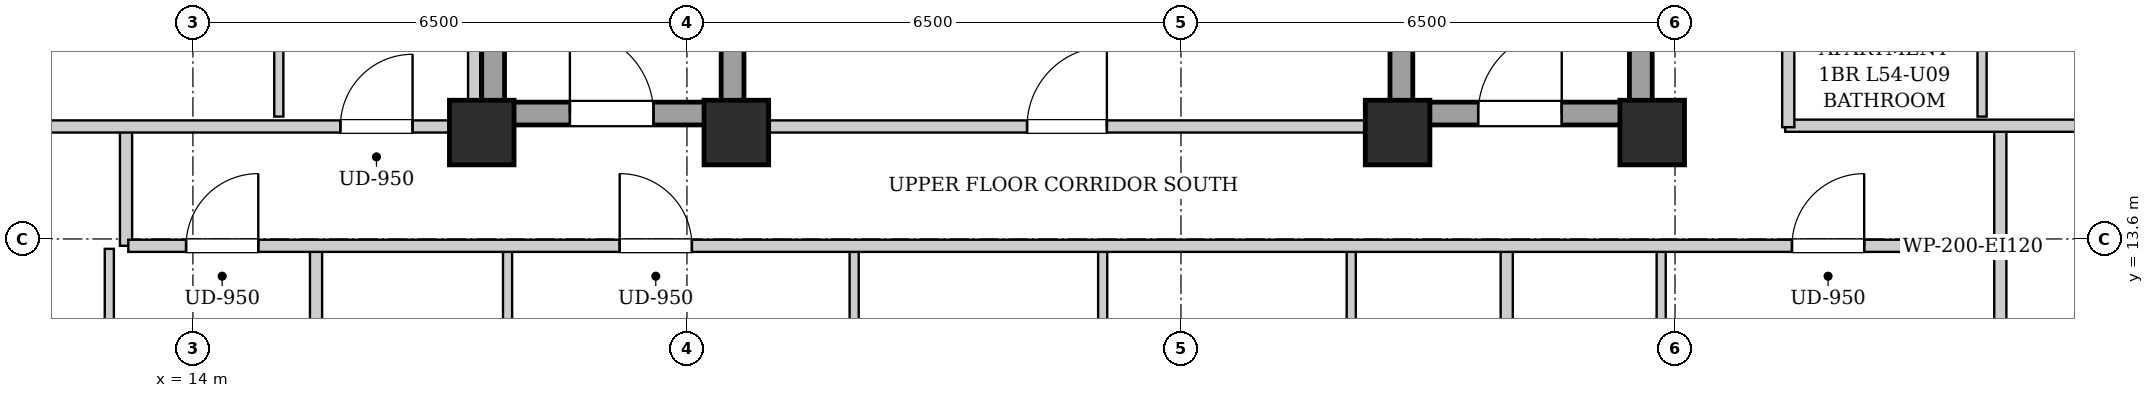
"""IFC4 building model, lengths in metres.
Left out: names, types, materials, properties, quantities, classifications, styles, units other than length and angle.
Written with IfcOpenShell. Run it as: python <this file> out.ifc"""

import sys

from ifc_helpers import new_model, si_unit, direction, frame, frame_2d, origin, origin_2d, place, context, subcontext, project, spatial, rectangle, extrude, element, fill, save


model = new_model("IFC4")
c1 = context("Model", 3, precision=1e-05, world=origin(), true_north=direction((0.0, 1.0)))
c2 = subcontext(c1, "Body", "Model", "MODEL_VIEW")
j1 = project(units=[si_unit("LENGTHUNIT", "METRE"), si_unit("PLANEANGLEUNIT", "RADIAN")], contexts=[c1])
p1 = place(None, origin())
s1 = spatial("IfcSite", under=j1, at=p1, CompositionType="ELEMENT")
p2 = place(p1, origin())
s2 = spatial("IfcBuilding", under=s1, at=p2, CompositionType="ELEMENT")
p3 = place(p2, frame((0.0, 0.0, 187.6)))
s3 = spatial("IfcBuildingStorey", under=s2, at=p3, CompositionType="ELEMENT", Elevation=187.6)
for number, where, z_axis, x_axis in (
    (1, (17.8, 15.0, 0.0), (0.0, 0.0, 1.0), (1.0, 0.0, 0.0)),
    (2, (21.15, 15.0, 0.0), (0.0, 0.0, 1.0), (1.0, 0.0, 0.0)),
    (3, (29.85, 15.0, 0.0), (0.0, 0.0, 1.0), (1.0, 0.0, 0.0)),
    (4, (33.2, 15.0, 0.0), (0.0, 0.0, 1.0), (1.0, 0.0, 0.0)),
):
    element("IfcColumn", number, at=place(p3, frame(where, z_axis=z_axis, x_axis=x_axis)), inside=s3, PredefinedType="COLUMN", context=c2, shape_type="SweptSolid", body=[
        extrude(rectangle(XDim=0.85, YDim=0.85, at=origin_2d()), origin(), (0.0, 0.0, 1.0), 3.3),
    ])
for number, where, z_axis, x_axis in (
    (5, (17.95, 15.1, 0.0), (0.0, 0.0, 1.0), (0.0, 1.0, 0.0)),
    (6, (21.1, 15.1, 0.0), (0.0, 0.0, 1.0), (0.0, 1.0, 0.0)),
):
    element("IfcWall", number, at=place(p3, frame(where, z_axis=z_axis, x_axis=x_axis)), inside=s3, PredefinedType="SHEAR", context=c2, shape_type="SweptSolid", body=[
        extrude(rectangle(XDim=9.0, YDim=0.3, at=frame_2d((4.5, 0.0))), origin(), (0.0, 0.0, 1.0), 3.04),
    ])
p4 = place(p3, frame((18.1, 15.25, 0.0), z_axis=(0.0, 0.0, 1.0), x_axis=(1.0, 0.0, 0.0)))
e7 = element("IfcWall", 7, at=p4, inside=s3, PredefinedType="SHEAR", context=c2, shape_type="SweptSolid", body=[
    extrude(rectangle(XDim=2.85, YDim=0.3, at=frame_2d((1.425, 0.0))), origin(), (0.0, 0.0, 1.0), 3.04),
])
p5 = place(p4, frame((0.86, 0.0, 0.0)))
e8 = element("IfcOpeningElement", 8, at=p5, cuts=e7, PredefinedType="OPENING", context=c2, shape_type="SweptSolid", body=[
    extrude(rectangle(XDim=1.1, YDim=2.05, at=frame_2d((0.55, 1.025))), frame((0.0, 0.16, 0.0), z_axis=(0.0, -1.0, 0.0), x_axis=(1.0, 0.0, 0.0)), (0.0, 0.0, 1.0), 0.32),
])
for number, where, z_axis, x_axis in (
    (9, (29.9, 15.1, 0.0), (0.0, 0.0, 1.0), (0.0, 1.0, 0.0)),
    (10, (33.05, 15.1, 0.0), (0.0, 0.0, 1.0), (0.0, 1.0, 0.0)),
):
    element("IfcWall", number, at=place(p3, frame(where, z_axis=z_axis, x_axis=x_axis)), inside=s3, PredefinedType="SHEAR", context=c2, shape_type="SweptSolid", body=[
        extrude(rectangle(XDim=9.0, YDim=0.3, at=frame_2d((4.5, 0.0))), origin(), (0.0, 0.0, 1.0), 3.04),
    ])
p6 = place(p3, frame((30.05, 15.25, 0.0), z_axis=(0.0, 0.0, 1.0), x_axis=(1.0, 0.0, 0.0)))
e11 = element("IfcWall", 11, at=p6, inside=s3, PredefinedType="SHEAR", context=c2, shape_type="SweptSolid", body=[
    extrude(rectangle(XDim=2.85, YDim=0.3, at=frame_2d((1.425, 0.0))), origin(), (0.0, 0.0, 1.0), 3.04),
])
p7 = place(p6, frame((0.86, 0.0, 0.0)))
e12 = element("IfcOpeningElement", 12, at=p7, cuts=e11, PredefinedType="OPENING", context=c2, shape_type="SweptSolid", body=[
    extrude(rectangle(XDim=1.1, YDim=2.05, at=frame_2d((0.55, 1.025))), frame((0.0, 0.16, 0.0), z_axis=(0.0, -1.0, 0.0), x_axis=(1.0, 0.0, 0.0)), (0.0, 0.0, 1.0), 0.32),
])
p8 = place(p3, frame((21.25, 15.08, 0.0), z_axis=(0.0, 0.0, 1.0), x_axis=(1.0, 0.0, 0.0)))
e13 = element("IfcWall", 13, at=p8, inside=s3, PredefinedType="PARTITIONING", context=c2, shape_type="SweptSolid", body=[
    extrude(rectangle(XDim=8.5, YDim=0.16, at=frame_2d((4.25, 0.0))), origin(), (0.0, 0.0, 1.0), 2.556),
])
p9 = place(p8, frame((3.725, 0.0, 0.0)))
e14 = element("IfcOpeningElement", 14, at=p9, cuts=e13, PredefinedType="OPENING", context=c2, shape_type="SweptSolid", body=[
    extrude(rectangle(XDim=1.05, YDim=2.05, at=frame_2d((0.525, 1.025))), frame((0.0, 0.09, 0.0), z_axis=(0.0, -1.0, 0.0), x_axis=(1.0, 0.0, 0.0)), (0.0, 0.0, 1.0), 0.18),
])
for number, where, z_axis, x_axis in (
    (15, (13.12, 13.51, 0.0), (0.0, 0.0, 1.0), (0.0, 1.0, 0.0)),
    (16, (37.78, 13.51, 0.0), (0.0, 0.0, 1.0), (0.0, 1.0, 0.0)),
):
    element("IfcWall", number, at=place(p3, frame(where, z_axis=z_axis, x_axis=x_axis)), inside=s3, PredefinedType="PARTITIONING", context=c2, shape_type="SweptSolid", body=[
        extrude(rectangle(XDim=1.58, YDim=0.16, at=frame_2d((0.79, 0.0))), origin(), (0.0, 0.0, 1.0), 3.04),
    ])
p10 = place(p3, frame((34.95, 15.09, 0.0), z_axis=(0.0, 0.0, 1.0), x_axis=(1.0, 0.0, 0.0)))
e17 = element("IfcWall", 17, at=p10, inside=s3, PredefinedType="PARTITIONING", context=c2, shape_type="SweptSolid", body=[
    extrude(rectangle(XDim=5.07, YDim=0.16, at=frame_2d((2.535, 0.0))), origin(), (0.0, 0.0, 1.0), 2.556),
])
p11 = place(p3, frame((12.9, 10.62, 0.0), z_axis=(0.0, 0.0, 1.0), x_axis=(0.0, 1.0, 0.0)))
e18 = element("IfcWall", 18, at=p11, inside=s3, PredefinedType="PARTITIONING", context=c2, shape_type="SweptSolid", body=[
    extrude(rectangle(XDim=2.85, YDim=0.12, at=frame_2d((1.425, 0.0))), origin(), (0.0, 0.0, 1.0), 3.04),
])
p12 = place(p11, frame((0.995, 0.0, 0.0)))
e19 = element("IfcOpeningElement", 19, at=p12, cuts=e18, PredefinedType="OPENING", context=c2, shape_type="SweptSolid", body=[
    extrude(rectangle(XDim=0.86, YDim=2.05, at=frame_2d((0.43, 1.025))), frame((0.0, 0.07, 0.0), z_axis=(0.0, -1.0, 0.0), x_axis=(1.0, 0.0, 0.0)), (0.0, 0.0, 1.0), 0.14),
])
p13 = place(p3, frame((15.62, 4.08, 0.0), z_axis=(0.0, 0.0, 1.0), x_axis=(0.0, 1.0, 0.0)))
e20 = element("IfcWall", 20, at=p13, inside=s3, PredefinedType="PARTITIONING", context=c2, shape_type="SweptSolid", body=[
    extrude(rectangle(XDim=9.39, YDim=0.16, at=frame_2d((4.695, 0.0))), origin(), (0.0, 0.0, 1.0), 3.04),
])
p14 = place(p3, frame((18.14, 10.62, 0.0), z_axis=(0.0, 0.0, 1.0), x_axis=(0.0, 1.0, 0.0)))
e21 = element("IfcWall", 21, at=p14, inside=s3, PredefinedType="PARTITIONING", context=c2, shape_type="SweptSolid", body=[
    extrude(rectangle(XDim=2.85, YDim=0.12, at=frame_2d((1.425, 0.0))), origin(), (0.0, 0.0, 1.0), 3.04),
])
p15 = place(p14, frame((0.995, 0.0, 0.0)))
e22 = element("IfcOpeningElement", 22, at=p15, cuts=e21, PredefinedType="OPENING", context=c2, shape_type="SweptSolid", body=[
    extrude(rectangle(XDim=0.86, YDim=2.05, at=frame_2d((0.43, 1.025))), frame((0.0, 0.07, 0.0), z_axis=(0.0, -1.0, 0.0), x_axis=(1.0, 0.0, 0.0)), (0.0, 0.0, 1.0), 0.14),
])
p16 = place(p3, frame((22.7, 10.62, 0.0), z_axis=(0.0, 0.0, 1.0), x_axis=(0.0, 1.0, 0.0)))
e23 = element("IfcWall", 23, at=p16, inside=s3, PredefinedType="PARTITIONING", context=c2, shape_type="SweptSolid", body=[
    extrude(rectangle(XDim=2.85, YDim=0.12, at=frame_2d((1.425, 0.0))), origin(), (0.0, 0.0, 1.0), 3.04),
])
p17 = place(p16, frame((0.975, 0.0, 0.0)))
e24 = element("IfcOpeningElement", 24, at=p17, cuts=e23, PredefinedType="OPENING", context=c2, shape_type="SweptSolid", body=[
    extrude(rectangle(XDim=0.9, YDim=2.05, at=frame_2d((0.45, 1.025))), frame((0.0, 0.07, 0.0), z_axis=(0.0, -1.0, 0.0), x_axis=(1.0, 0.0, 0.0)), (0.0, 0.0, 1.0), 0.14),
])
p18 = place(p3, frame((25.97, 10.62, 0.0), z_axis=(0.0, 0.0, 1.0), x_axis=(0.0, 1.0, 0.0)))
e25 = element("IfcWall", 25, at=p18, inside=s3, PredefinedType="PARTITIONING", context=c2, shape_type="SweptSolid", body=[
    extrude(rectangle(XDim=2.85, YDim=0.12, at=frame_2d((1.425, 0.0))), origin(), (0.0, 0.0, 1.0), 3.04),
])
p19 = place(p18, frame((0.975, 0.0, 0.0)))
e26 = element("IfcOpeningElement", 26, at=p19, cuts=e25, PredefinedType="OPENING", context=c2, shape_type="SweptSolid", body=[
    extrude(rectangle(XDim=0.9, YDim=2.05, at=frame_2d((0.45, 1.025))), frame((0.0, 0.07, 0.0), z_axis=(0.0, -1.0, 0.0), x_axis=(1.0, 0.0, 0.0)), (0.0, 0.0, 1.0), 0.14),
])
p20 = place(p3, frame((29.24, 10.62, 0.0), z_axis=(0.0, 0.0, 1.0), x_axis=(0.0, 1.0, 0.0)))
e27 = element("IfcWall", 27, at=p20, inside=s3, PredefinedType="PARTITIONING", context=c2, shape_type="SweptSolid", body=[
    extrude(rectangle(XDim=2.85, YDim=0.12, at=frame_2d((1.425, 0.0))), origin(), (0.0, 0.0, 1.0), 3.04),
])
p21 = place(p20, frame((0.975, 0.0, 0.0)))
e28 = element("IfcOpeningElement", 28, at=p21, cuts=e27, PredefinedType="OPENING", context=c2, shape_type="SweptSolid", body=[
    extrude(rectangle(XDim=0.9, YDim=2.05, at=frame_2d((0.45, 1.025))), frame((0.0, 0.07, 0.0), z_axis=(0.0, -1.0, 0.0), x_axis=(1.0, 0.0, 0.0)), (0.0, 0.0, 1.0), 0.14),
])
p22 = place(p3, frame((37.78, 10.56, 0.0), z_axis=(0.0, 0.0, 1.0), x_axis=(0.0, 1.0, 0.0)))
e29 = element("IfcWall", 29, at=p22, inside=s3, PredefinedType="PARTITIONING", context=c2, shape_type="SweptSolid", body=[
    extrude(rectangle(XDim=2.91, YDim=0.16, at=frame_2d((1.455, 0.0))), origin(), (0.0, 0.0, 1.0), 3.04),
])
p23 = place(p3, frame((31.286, 4.08, 0.0), z_axis=(0.0, 0.0, 1.0), x_axis=(0.0, 1.0, 0.0)))
e30 = element("IfcWall", 30, at=p23, inside=s3, PredefinedType="PARTITIONING", context=c2, shape_type="SweptSolid", body=[
    extrude(rectangle(XDim=9.39, YDim=0.16, at=frame_2d((4.695, 0.0))), origin(), (0.0, 0.0, 1.0), 3.04),
])
p24 = place(p3, frame((33.318, 10.62, 0.0), z_axis=(0.0, 0.0, 1.0), x_axis=(0.0, 1.0, 0.0)))
e31 = element("IfcWall", 31, at=p24, inside=s3, PredefinedType="PARTITIONING", context=c2, shape_type="SweptSolid", body=[
    extrude(rectangle(XDim=2.85, YDim=0.12, at=frame_2d((1.425, 0.0))), origin(), (0.0, 0.0, 1.0), 3.04),
])
p25 = place(p24, frame((0.995, 0.0, 0.0)))
e32 = element("IfcOpeningElement", 32, at=p25, cuts=e31, PredefinedType="OPENING", context=c2, shape_type="SweptSolid", body=[
    extrude(rectangle(XDim=0.86, YDim=2.05, at=frame_2d((0.43, 1.025))), frame((0.0, 0.07, 0.0), z_axis=(0.0, -1.0, 0.0), x_axis=(1.0, 0.0, 0.0)), (0.0, 0.0, 1.0), 0.14),
])
p26 = place(p3, frame((10.88, 15.08, 0.0), z_axis=(0.0, 0.0, 1.0), x_axis=(1.0, 0.0, 0.0)))
e33 = element("IfcWall", 33, at=p26, inside=s3, PredefinedType="PARTITIONING", context=c2, shape_type="SweptSolid", body=[
    extrude(rectangle(XDim=6.88, YDim=0.16, at=frame_2d((3.44, 0.0))), origin(), (0.0, 0.0, 1.0), 2.556),
])
p27 = place(p26, frame((5.06, 0.0, 0.0)))
e34 = element("IfcOpeningElement", 34, at=p27, cuts=e33, PredefinedType="OPENING", context=c2, shape_type="SweptSolid", body=[
    extrude(rectangle(XDim=0.95, YDim=2.1, at=frame_2d((0.475, 1.05))), frame((0.0, 0.09, 0.0), z_axis=(0.0, -1.0, 0.0), x_axis=(1.0, 0.0, 0.0)), (0.0, 0.0, 1.0), 0.18),
])
p28 = place(p3, frame((15.13, 15.21, 0.0), z_axis=(0.0, 0.0, 1.0), x_axis=(0.0, 1.0, 0.0)))
e35 = element("IfcWall", 35, at=p28, inside=s3, PredefinedType="PARTITIONING", context=c2, shape_type="SweptSolid", body=[
    extrude(rectangle(XDim=4.5, YDim=0.12, at=frame_2d((2.25, 0.0))), origin(), (0.0, 0.0, 1.0), 3.04),
])
p29 = place(p28, frame((1.8, 0.0, 0.0)))
e36 = element("IfcOpeningElement", 36, at=p29, cuts=e35, PredefinedType="OPENING", context=c2, shape_type="SweptSolid", body=[
    extrude(rectangle(XDim=0.9, YDim=2.05, at=frame_2d((0.45, 1.025))), frame((0.0, 0.07, 0.0), z_axis=(0.0, -1.0, 0.0), x_axis=(1.0, 0.0, 0.0)), (0.0, 0.0, 1.0), 0.14),
])
p30 = place(p3, frame((37.54, 15.21, 0.0), z_axis=(0.0, 0.0, 1.0), x_axis=(0.0, 1.0, 0.0)))
e37 = element("IfcWall", 37, at=p30, inside=s3, PredefinedType="PARTITIONING", context=c2, shape_type="SweptSolid", body=[
    extrude(rectangle(XDim=2.159, YDim=0.12, at=frame_2d((1.08, 0.0))), origin(), (0.0, 0.0, 1.0), 3.04),
])
p31 = place(p3, frame((13.15, 13.51, 0.0), z_axis=(0.0, 0.0, 1.0), x_axis=(1.0, 0.0, 0.0)))
e38 = element("IfcWall", 38, at=p31, inside=s3, PredefinedType="PARTITIONING", context=c2, shape_type="SweptSolid", body=[
    extrude(rectangle(XDim=24.6, YDim=0.16, at=frame_2d((12.3, 0.0))), origin(), (0.0, 0.0, 1.0), 3.04),
])
p32 = place(p31, frame((0.76, 0.0, 0.0)))
e39 = element("IfcOpeningElement", 39, at=p32, cuts=e38, PredefinedType="OPENING", context=c2, shape_type="SweptSolid", body=[
    extrude(rectangle(XDim=0.95, YDim=2.1, at=frame_2d((0.475, 1.05))), frame((0.0, 0.09, 0.0), z_axis=(0.0, -1.0, 0.0), x_axis=(1.0, 0.0, 0.0)), (0.0, 0.0, 1.0), 0.18),
])
p33 = place(p31, frame((6.465, 0.0, 0.0)))
e40 = element("IfcOpeningElement", 40, at=p33, cuts=e38, PredefinedType="OPENING", context=c2, shape_type="SweptSolid", body=[
    extrude(rectangle(XDim=0.95, YDim=2.1, at=frame_2d((0.475, 1.05))), frame((0.0, 0.09, 0.0), z_axis=(0.0, -1.0, 0.0), x_axis=(1.0, 0.0, 0.0)), (0.0, 0.0, 1.0), 0.18),
])
p34 = place(p31, frame((21.889, 0.0, 0.0)))
e41 = element("IfcOpeningElement", 41, at=p34, cuts=e38, PredefinedType="OPENING", context=c2, shape_type="SweptSolid", body=[
    extrude(rectangle(XDim=0.95, YDim=2.1, at=frame_2d((0.475, 1.05))), frame((0.0, 0.09, 0.0), z_axis=(0.0, -1.0, 0.0), x_axis=(1.0, 0.0, 0.0)), (0.0, 0.0, 1.0), 0.18),
])
p35 = place(p3, frame((17.7, 15.02, 0.0), z_axis=(0.0, 0.0, 1.0), x_axis=(0.0, 1.0, 0.0)))
e42 = element("IfcWall", 42, at=p35, inside=s3, PredefinedType="PARTITIONING", context=c2, shape_type="SweptSolid", body=[
    extrude(rectangle(XDim=13.98, YDim=0.16, at=frame_2d((6.99, 0.0))), origin(), (0.0, 0.0, 1.0), 2.375),
])
p36 = place(p3, frame((34.99, 15.07, 0.0), z_axis=(0.0, 0.0, 1.0), x_axis=(0.0, 1.0, 0.0)))
e43 = element("IfcWall", 43, at=p36, inside=s3, PredefinedType="PARTITIONING", context=c2, shape_type="SweptSolid", body=[
    extrude(rectangle(XDim=13.93, YDim=0.16, at=frame_2d((6.965, 0.0))), origin(), (0.0, 0.0, 1.0), 3.04),
])
p37 = place(p36, frame((4.661, 0.0, 0.0)))
e44 = element("IfcOpeningElement", 44, at=p37, cuts=e43, PredefinedType="OPENING", context=c2, shape_type="SweptSolid", body=[
    extrude(rectangle(XDim=0.95, YDim=2.1, at=frame_2d((0.475, 1.05))), frame((0.0, 0.09, 0.0), z_axis=(0.0, -1.0, 0.0), x_axis=(1.0, 0.0, 0.0)), (0.0, 0.0, 1.0), 0.18),
])
p38 = place(p36, frame((11.411, 0.0, 0.0)))
e45 = element("IfcOpeningElement", 45, at=p38, cuts=e43, PredefinedType="OPENING", context=c2, shape_type="SweptSolid", body=[
    extrude(rectangle(XDim=0.95, YDim=2.1, at=frame_2d((0.475, 1.05))), frame((0.0, 0.09, 0.0), z_axis=(0.0, -1.0, 0.0), x_axis=(1.0, 0.0, 0.0)), (0.0, 0.0, 1.0), 0.18),
])
p39 = place(p5, origin())
e46 = element("IfcDoor", 46, at=p39, inside=s3, OperationType="SINGLE_SWING_LEFT", PredefinedType="DOOR", context=c2, shape_type="SweptSolid", body=[
    extrude(rectangle(XDim=1.1, YDim=2.05, at=frame_2d((0.55, 1.025))), frame((0.0, 0.025, 0.0), z_axis=(0.0, -1.0, 0.0), x_axis=(1.0, 0.0, 0.0)), (0.0, 0.0, 1.0), 0.05),
])
fill(e8, e46)
p40 = place(p7, origin())
e47 = element("IfcDoor", 47, at=p40, inside=s3, OperationType="SINGLE_SWING_RIGHT", PredefinedType="DOOR", context=c2, shape_type="SweptSolid", body=[
    extrude(rectangle(XDim=1.1, YDim=2.05, at=frame_2d((0.55, 1.025))), frame((0.0, 0.025, 0.0), z_axis=(0.0, -1.0, 0.0), x_axis=(1.0, 0.0, 0.0)), (0.0, 0.0, 1.0), 0.05),
])
fill(e12, e47)
p41 = place(p9, origin())
e48 = element("IfcDoor", 48, at=p41, inside=s3, OperationType="SINGLE_SWING_RIGHT", PredefinedType="DOOR", context=c2, shape_type="SweptSolid", body=[
    extrude(rectangle(XDim=1.05, YDim=2.05, at=frame_2d((0.525, 1.025))), frame((0.0, 0.025, 0.0), z_axis=(0.0, -1.0, 0.0), x_axis=(1.0, 0.0, 0.0)), (0.0, 0.0, 1.0), 0.05),
])
fill(e14, e48)
p42 = place(p27, origin())
e49 = element("IfcDoor", 49, at=p42, inside=s3, OperationType="SINGLE_SWING_RIGHT", PredefinedType="DOOR", context=c2, shape_type="SweptSolid", body=[
    extrude(rectangle(XDim=0.95, YDim=2.1, at=frame_2d((0.475, 1.05))), frame((0.0, 0.025, 0.0), z_axis=(0.0, -1.0, 0.0), x_axis=(1.0, 0.0, 0.0)), (0.0, 0.0, 1.0), 0.05),
])
fill(e34, e49)
p43 = place(p32, origin())
e50 = element("IfcDoor", 50, at=p43, inside=s3, OperationType="SINGLE_SWING_RIGHT", PredefinedType="DOOR", context=c2, shape_type="SweptSolid", body=[
    extrude(rectangle(XDim=0.95, YDim=2.1, at=frame_2d((0.475, 1.05))), frame((0.0, 0.025, 0.0), z_axis=(0.0, -1.0, 0.0), x_axis=(1.0, 0.0, 0.0)), (0.0, 0.0, 1.0), 0.05),
])
fill(e39, e50)
p44 = place(p33, origin())
e51 = element("IfcDoor", 51, at=p44, inside=s3, OperationType="SINGLE_SWING_LEFT", PredefinedType="DOOR", context=c2, shape_type="SweptSolid", body=[
    extrude(rectangle(XDim=0.95, YDim=2.1, at=frame_2d((0.475, 1.05))), frame((0.0, 0.025, 0.0), z_axis=(0.0, -1.0, 0.0), x_axis=(1.0, 0.0, 0.0)), (0.0, 0.0, 1.0), 0.05),
])
fill(e40, e51)
p45 = place(p34, origin())
e52 = element("IfcDoor", 52, at=p45, inside=s3, OperationType="SINGLE_SWING_RIGHT", PredefinedType="DOOR", context=c2, shape_type="SweptSolid", body=[
    extrude(rectangle(XDim=0.95, YDim=2.1, at=frame_2d((0.475, 1.05))), frame((0.0, 0.025, 0.0), z_axis=(0.0, -1.0, 0.0), x_axis=(1.0, 0.0, 0.0)), (0.0, 0.0, 1.0), 0.05),
])
fill(e41, e52)
save(model, sys.argv[1])
